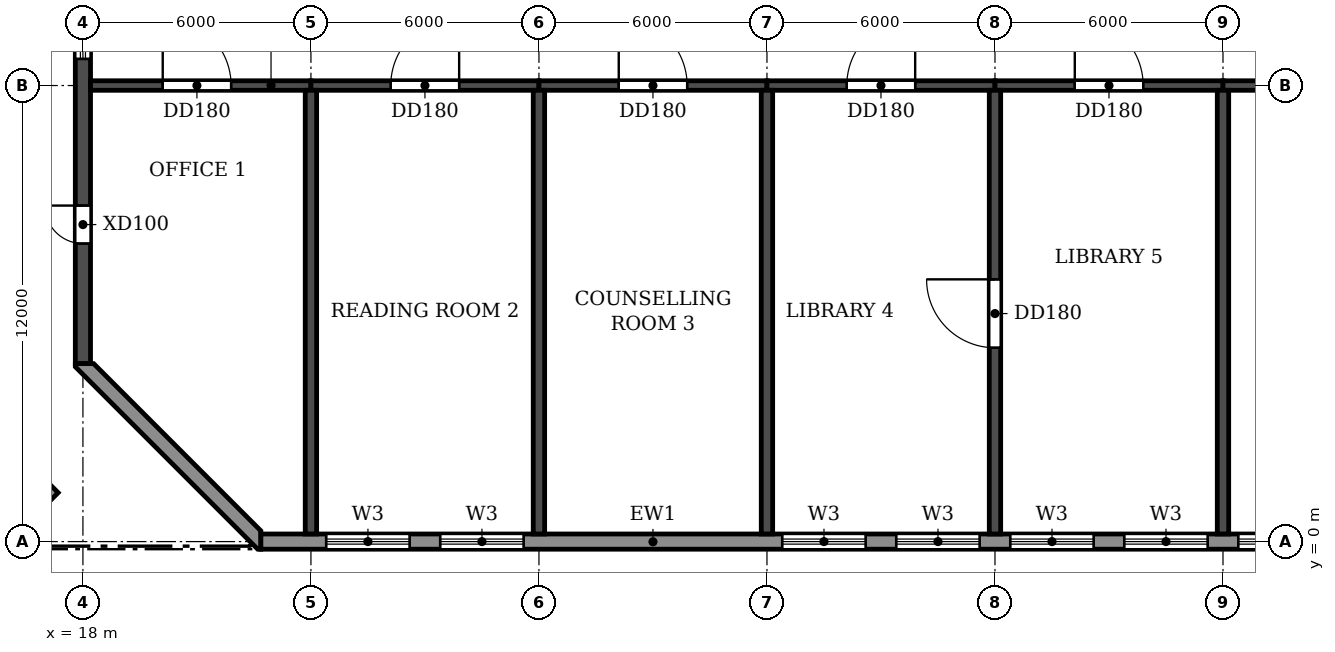
"""IFC4 building model, lengths in metres.
Left out: names, types, materials, properties, quantities, classifications, styles, units other than length and angle.
Written with IfcOpenShell. Run it as: python <this file> out.ifc"""

import sys

from ifc_helpers import new_model, si_unit, direction, frame, frame_2d, origin, place, context, subcontext, project, spatial, polyline, rectangle, outline, extrude, source, transform, mapped, element, fill, save


model = new_model("IFC4")
c1 = context("Model", 3, precision=1e-05, world=origin(), true_north=direction((0.0, 1.0)))
c2 = subcontext(c1, "Body", "Model", "MODEL_VIEW")
j1 = project(units=[si_unit("LENGTHUNIT", "METRE"), si_unit("PLANEANGLEUNIT", "RADIAN")], contexts=[c1])
p1 = place(None, origin())
s1 = spatial("IfcSite", under=j1, at=p1, CompositionType="ELEMENT")
p2 = place(p1, origin())
s2 = spatial("IfcBuilding", under=s1, at=p2, CompositionType="ELEMENT")
p3 = place(p2, frame((0.0, 0.0, 158.7)))
s3 = spatial("IfcBuildingStorey", under=s2, at=p3, CompositionType="ELEMENT", Elevation=158.7)
for number, where, z_axis, x_axis in (
    (1, (24.0, 0.2, 0.0), (0.0, 0.0, 1.0), (0.0, 1.0, 0.0)),
    (2, (30.0, 0.2, 0.0), (0.0, 0.0, 1.0), (0.0, 1.0, 0.0)),
    (3, (36.0, 0.2, 0.0), (0.0, 0.0, 1.0), (0.0, 1.0, 0.0)),
):
    element("IfcWall", number, at=place(p3, frame(where, z_axis=z_axis, x_axis=x_axis)), inside=s3, PredefinedType="SHEAR", context=c2, shape_type="SweptSolid", body=[
        extrude(rectangle(XDim=11.675, YDim=0.3, at=frame_2d((5.837, 0.0))), origin(), (0.0, 0.0, 1.0), 3.07),
    ])
p4 = place(p3, frame((42.0, 0.2, 0.0), z_axis=(0.0, 0.0, 1.0), x_axis=(0.0, 1.0, 0.0)))
e4 = element("IfcWall", 4, at=p4, inside=s3, PredefinedType="SHEAR", context=c2, shape_type="SweptSolid", body=[
    extrude(rectangle(XDim=11.675, YDim=0.3, at=frame_2d((5.837, 0.0))), origin(), (0.0, 0.0, 1.0), 3.07),
])
p5 = place(p4, frame((4.9, 0.0, 0.0)))
e5 = element("IfcOpeningElement", 5, at=p5, cuts=e4, PredefinedType="OPENING", context=c2, shape_type="SweptSolid", body=[
    extrude(rectangle(XDim=1.8, YDim=2.1, at=frame_2d((0.9, 1.05))), frame((0.0, 0.16, 0.0), z_axis=(0.0, -1.0, 0.0), x_axis=(1.0, 0.0, 0.0)), (0.0, 0.0, 1.0), 0.32),
])
p6 = place(p3, frame((48.0, 0.2, 0.0), z_axis=(0.0, 0.0, 1.0), x_axis=(0.0, 1.0, 0.0)))
e6 = element("IfcWall", 6, at=p6, inside=s3, PredefinedType="SHEAR", context=c2, shape_type="SweptSolid", body=[
    extrude(rectangle(XDim=11.675, YDim=0.3, at=frame_2d((5.837, 0.0))), origin(), (0.0, 0.0, 1.0), 3.07),
])
p7 = place(p3, frame((18.0, 4.683, 0.0), z_axis=(0.0, 0.0, 1.0), x_axis=(0.0, 1.0, 0.0)))
e7 = element("IfcWall", 7, at=p7, inside=s3, PredefinedType="SHEAR", context=c2, shape_type="SweptSolid", body=[
    extrude(rectangle(XDim=33.034, YDim=0.4, at=frame_2d((16.517, 0.0))), origin(), (0.0, 0.0, 1.0), 3.07),
])
p8 = place(p7, frame((23.817, 0.0, 0.9)))
e8 = element("IfcOpeningElement", 8, at=p8, cuts=e7, PredefinedType="OPENING", context=c2, shape_type="SweptSolid", body=[
    extrude(rectangle(XDim=1.2, YDim=1.5, at=frame_2d((0.6, 0.75))), frame((0.0, 0.21, 0.0), z_axis=(0.0, -1.0, 0.0), x_axis=(1.0, 0.0, 0.0)), (0.0, 0.0, 1.0), 0.42),
])
p9 = place(p7, frame((8.017, 0.0, 0.9)))
e9 = element("IfcOpeningElement", 9, at=p9, cuts=e7, PredefinedType="OPENING", context=c2, shape_type="SweptSolid", body=[
    extrude(rectangle(XDim=1.2, YDim=1.5, at=frame_2d((0.6, 0.75))), frame((0.0, 0.21, 0.0), z_axis=(0.0, -1.0, 0.0), x_axis=(1.0, 0.0, 0.0)), (0.0, 0.0, 1.0), 0.42),
])
p10 = place(p7, frame((15.917, 0.0, 0.9)))
e10 = element("IfcOpeningElement", 10, at=p10, cuts=e7, PredefinedType="OPENING", context=c2, shape_type="SweptSolid", body=[
    extrude(rectangle(XDim=1.2, YDim=1.5, at=frame_2d((0.6, 0.75))), frame((0.0, 0.21, 0.0), z_axis=(0.0, -1.0, 0.0), x_axis=(1.0, 0.0, 0.0)), (0.0, 0.0, 1.0), 0.42),
])
p11 = place(p7, frame((28.876, 0.0, 0.0)))
e11 = element("IfcOpeningElement", 11, at=p11, cuts=e7, PredefinedType="OPENING", context=c2, shape_type="SweptSolid", body=[
    extrude(rectangle(XDim=1.0, YDim=2.1, at=frame_2d((0.5, 1.05))), frame((0.0, 0.21, 0.0), z_axis=(0.0, -1.0, 0.0), x_axis=(1.0, 0.0, 0.0)), (0.0, 0.0, 1.0), 0.42),
])
p12 = place(p7, frame((3.159, 0.0, 0.0)))
e12 = element("IfcOpeningElement", 12, at=p12, cuts=e7, PredefinedType="OPENING", context=c2, shape_type="SweptSolid", body=[
    extrude(rectangle(XDim=1.0, YDim=2.1, at=frame_2d((0.5, 1.05))), frame((0.0, 0.21, 0.0), z_axis=(0.0, -1.0, 0.0), x_axis=(1.0, 0.0, 0.0)), (0.0, 0.0, 1.0), 0.42),
])
p13 = place(p3, frame((18.2, 12.0, 0.0), z_axis=(0.0, 0.0, 1.0), x_axis=(1.0, 0.0, 0.0)))
e13 = element("IfcWall", 13, at=p13, inside=s3, PredefinedType="SHEAR", context=c2, shape_type="SweptSolid", body=[
    extrude(rectangle(XDim=5.8, YDim=0.25, at=frame_2d((2.9, 0.0))), origin(), (0.0, 0.0, 1.0), 2.47),
])
p14 = place(p13, frame((1.9, 0.0, 0.0)))
e14 = element("IfcOpeningElement", 14, at=p14, cuts=e13, PredefinedType="OPENING", context=c2, shape_type="SweptSolid", body=[
    extrude(rectangle(XDim=1.8, YDim=2.1, at=frame_2d((0.9, 1.05))), frame((0.0, 0.135, 0.0), z_axis=(0.0, -1.0, 0.0), x_axis=(1.0, 0.0, 0.0)), (0.0, 0.0, 1.0), 0.27),
])
p15 = place(p3, frame((24.0, 12.0, 0.0), z_axis=(0.0, 0.0, 1.0), x_axis=(1.0, 0.0, 0.0)))
e15 = element("IfcWall", 15, at=p15, inside=s3, PredefinedType="SHEAR", context=c2, shape_type="SweptSolid", body=[
    extrude(rectangle(XDim=6.0, YDim=0.25, at=frame_2d((3.0, 0.0))), origin(), (0.0, 0.0, 1.0), 2.47),
])
p16 = place(p15, frame((2.1, 0.0, 0.0)))
e16 = element("IfcOpeningElement", 16, at=p16, cuts=e15, PredefinedType="OPENING", context=c2, shape_type="SweptSolid", body=[
    extrude(rectangle(XDim=1.8, YDim=2.1, at=frame_2d((0.9, 1.05))), frame((0.0, 0.135, 0.0), z_axis=(0.0, -1.0, 0.0), x_axis=(1.0, 0.0, 0.0)), (0.0, 0.0, 1.0), 0.27),
])
p17 = place(p3, frame((30.0, 12.0, 0.0), z_axis=(0.0, 0.0, 1.0), x_axis=(1.0, 0.0, 0.0)))
e17 = element("IfcWall", 17, at=p17, inside=s3, PredefinedType="SHEAR", context=c2, shape_type="SweptSolid", body=[
    extrude(rectangle(XDim=6.0, YDim=0.25, at=frame_2d((3.0, 0.0))), origin(), (0.0, 0.0, 1.0), 2.47),
])
p18 = place(p17, frame((2.1, 0.0, 0.0)))
e18 = element("IfcOpeningElement", 18, at=p18, cuts=e17, PredefinedType="OPENING", context=c2, shape_type="SweptSolid", body=[
    extrude(rectangle(XDim=1.8, YDim=2.1, at=frame_2d((0.9, 1.05))), frame((0.0, 0.135, 0.0), z_axis=(0.0, -1.0, 0.0), x_axis=(1.0, 0.0, 0.0)), (0.0, 0.0, 1.0), 0.27),
])
p19 = place(p3, frame((36.0, 12.0, 0.0), z_axis=(0.0, 0.0, 1.0), x_axis=(1.0, 0.0, 0.0)))
e19 = element("IfcWall", 19, at=p19, inside=s3, PredefinedType="SHEAR", context=c2, shape_type="SweptSolid", body=[
    extrude(rectangle(XDim=6.0, YDim=0.25, at=frame_2d((3.0, 0.0))), origin(), (0.0, 0.0, 1.0), 2.47),
])
p20 = place(p19, frame((2.1, 0.0, 0.0)))
e20 = element("IfcOpeningElement", 20, at=p20, cuts=e19, PredefinedType="OPENING", context=c2, shape_type="SweptSolid", body=[
    extrude(rectangle(XDim=1.8, YDim=2.1, at=frame_2d((0.9, 1.05))), frame((0.0, 0.135, 0.0), z_axis=(0.0, -1.0, 0.0), x_axis=(1.0, 0.0, 0.0)), (0.0, 0.0, 1.0), 0.27),
])
p21 = place(p3, frame((42.0, 12.0, 0.0), z_axis=(0.0, 0.0, 1.0), x_axis=(1.0, 0.0, 0.0)))
e21 = element("IfcWall", 21, at=p21, inside=s3, PredefinedType="SHEAR", context=c2, shape_type="SweptSolid", body=[
    extrude(rectangle(XDim=6.0, YDim=0.25, at=frame_2d((3.0, 0.0))), origin(), (0.0, 0.0, 1.0), 2.47),
])
p22 = place(p21, frame((2.1, 0.0, 0.0)))
e22 = element("IfcOpeningElement", 22, at=p22, cuts=e21, PredefinedType="OPENING", context=c2, shape_type="SweptSolid", body=[
    extrude(rectangle(XDim=1.8, YDim=2.1, at=frame_2d((0.9, 1.05))), frame((0.0, 0.135, 0.0), z_axis=(0.0, -1.0, 0.0), x_axis=(1.0, 0.0, 0.0)), (0.0, 0.0, 1.0), 0.27),
])
p23 = place(p3, frame((48.0, 12.0, 0.0), z_axis=(0.0, 0.0, 1.0), x_axis=(1.0, 0.0, 0.0)))
e23 = element("IfcWall", 23, at=p23, inside=s3, PredefinedType="SHEAR", context=c2, shape_type="SweptSolid", body=[
    extrude(rectangle(XDim=6.0, YDim=0.25, at=frame_2d((3.0, 0.0))), origin(), (0.0, 0.0, 1.0), 2.47),
])
p24 = place(p23, frame((2.1, 0.0, 0.0)))
e24 = element("IfcOpeningElement", 24, at=p24, cuts=e23, PredefinedType="OPENING", context=c2, shape_type="SweptSolid", body=[
    extrude(rectangle(XDim=1.8, YDim=2.1, at=frame_2d((0.9, 1.05))), frame((0.0, 0.135, 0.0), z_axis=(0.0, -1.0, 0.0), x_axis=(1.0, 0.0, 0.0)), (0.0, 0.0, 1.0), 0.27),
])
p25 = place(p3, frame((22.683, 0.0, 0.0), z_axis=(0.0, 0.0, 1.0), x_axis=(1.0, 0.0, 0.0)))
e25 = element("IfcWall", 25, at=p25, inside=s3, PredefinedType="STANDARD", context=c2, shape_type="SweptSolid", body=[
    extrude(rectangle(XDim=56.634, YDim=0.4, at=frame_2d((28.317, 0.0))), origin(), (0.0, 0.0, 1.0), 3.07),
])
p26 = place(p25, frame((1.717, 0.0, 0.6)))
e26 = element("IfcOpeningElement", 26, at=p26, cuts=e25, PredefinedType="OPENING", context=c2, shape_type="SweptSolid", body=[
    extrude(rectangle(XDim=2.2, YDim=1.8, at=frame_2d((1.1, 0.9))), frame((0.0, 0.21, 0.0), z_axis=(0.0, -1.0, 0.0), x_axis=(1.0, 0.0, 0.0)), (0.0, 0.0, 1.0), 0.42),
])
p27 = place(p25, frame((4.717, 0.0, 0.6)))
e27 = element("IfcOpeningElement", 27, at=p27, cuts=e25, PredefinedType="OPENING", context=c2, shape_type="SweptSolid", body=[
    extrude(rectangle(XDim=2.2, YDim=1.8, at=frame_2d((1.1, 0.9))), frame((0.0, 0.21, 0.0), z_axis=(0.0, -1.0, 0.0), x_axis=(1.0, 0.0, 0.0)), (0.0, 0.0, 1.0), 0.42),
])
p28 = place(p25, frame((13.717, 0.0, 0.6)))
e28 = element("IfcOpeningElement", 28, at=p28, cuts=e25, PredefinedType="OPENING", context=c2, shape_type="SweptSolid", body=[
    extrude(rectangle(XDim=2.2, YDim=1.8, at=frame_2d((1.1, 0.9))), frame((0.0, 0.21, 0.0), z_axis=(0.0, -1.0, 0.0), x_axis=(1.0, 0.0, 0.0)), (0.0, 0.0, 1.0), 0.42),
])
p29 = place(p25, frame((16.717, 0.0, 0.6)))
e29 = element("IfcOpeningElement", 29, at=p29, cuts=e25, PredefinedType="OPENING", context=c2, shape_type="SweptSolid", body=[
    extrude(rectangle(XDim=2.2, YDim=1.8, at=frame_2d((1.1, 0.9))), frame((0.0, 0.21, 0.0), z_axis=(0.0, -1.0, 0.0), x_axis=(1.0, 0.0, 0.0)), (0.0, 0.0, 1.0), 0.42),
])
p30 = place(p25, frame((19.717, 0.0, 0.6)))
e30 = element("IfcOpeningElement", 30, at=p30, cuts=e25, PredefinedType="OPENING", context=c2, shape_type="SweptSolid", body=[
    extrude(rectangle(XDim=2.2, YDim=1.8, at=frame_2d((1.1, 0.9))), frame((0.0, 0.21, 0.0), z_axis=(0.0, -1.0, 0.0), x_axis=(1.0, 0.0, 0.0)), (0.0, 0.0, 1.0), 0.42),
])
p31 = place(p25, frame((22.717, 0.0, 0.6)))
e31 = element("IfcOpeningElement", 31, at=p31, cuts=e25, PredefinedType="OPENING", context=c2, shape_type="SweptSolid", body=[
    extrude(rectangle(XDim=2.2, YDim=1.8, at=frame_2d((1.1, 0.9))), frame((0.0, 0.21, 0.0), z_axis=(0.0, -1.0, 0.0), x_axis=(1.0, 0.0, 0.0)), (0.0, 0.0, 1.0), 0.42),
])
p32 = place(p25, frame((25.717, 0.0, 0.6)))
e32 = element("IfcOpeningElement", 32, at=p32, cuts=e25, PredefinedType="OPENING", context=c2, shape_type="SweptSolid", body=[
    extrude(rectangle(XDim=2.2, YDim=1.8, at=frame_2d((1.1, 0.9))), frame((0.0, 0.21, 0.0), z_axis=(0.0, -1.0, 0.0), x_axis=(1.0, 0.0, 0.0)), (0.0, 0.0, 1.0), 0.42),
])
p33 = place(p25, frame((28.717, 0.0, 0.6)))
e33 = element("IfcOpeningElement", 33, at=p33, cuts=e25, PredefinedType="OPENING", context=c2, shape_type="SweptSolid", body=[
    extrude(rectangle(XDim=2.2, YDim=1.8, at=frame_2d((1.1, 0.9))), frame((0.0, 0.21, 0.0), z_axis=(0.0, -1.0, 0.0), x_axis=(1.0, 0.0, 0.0)), (0.0, 0.0, 1.0), 0.42),
])
p34 = place(p25, frame((31.717, 0.0, 0.6)))
e34 = element("IfcOpeningElement", 34, at=p34, cuts=e25, PredefinedType="OPENING", context=c2, shape_type="SweptSolid", body=[
    extrude(rectangle(XDim=2.2, YDim=1.8, at=frame_2d((1.1, 0.9))), frame((0.0, 0.21, 0.0), z_axis=(0.0, -1.0, 0.0), x_axis=(1.0, 0.0, 0.0)), (0.0, 0.0, 1.0), 0.42),
])
p35 = place(p25, frame((34.717, 0.0, 0.6)))
e35 = element("IfcOpeningElement", 35, at=p35, cuts=e25, PredefinedType="OPENING", context=c2, shape_type="SweptSolid", body=[
    extrude(rectangle(XDim=2.2, YDim=1.8, at=frame_2d((1.1, 0.9))), frame((0.0, 0.21, 0.0), z_axis=(0.0, -1.0, 0.0), x_axis=(1.0, 0.0, 0.0)), (0.0, 0.0, 1.0), 0.42),
])
p36 = place(p25, frame((37.717, 0.0, 0.6)))
e36 = element("IfcOpeningElement", 36, at=p36, cuts=e25, PredefinedType="OPENING", context=c2, shape_type="SweptSolid", body=[
    extrude(rectangle(XDim=2.2, YDim=1.8, at=frame_2d((1.1, 0.9))), frame((0.0, 0.21, 0.0), z_axis=(0.0, -1.0, 0.0), x_axis=(1.0, 0.0, 0.0)), (0.0, 0.0, 1.0), 0.42),
])
p37 = place(p25, frame((40.717, 0.0, 0.6)))
e37 = element("IfcOpeningElement", 37, at=p37, cuts=e25, PredefinedType="OPENING", context=c2, shape_type="SweptSolid", body=[
    extrude(rectangle(XDim=2.2, YDim=1.8, at=frame_2d((1.1, 0.9))), frame((0.0, 0.21, 0.0), z_axis=(0.0, -1.0, 0.0), x_axis=(1.0, 0.0, 0.0)), (0.0, 0.0, 1.0), 0.42),
])
p38 = place(p25, frame((43.717, 0.0, 0.6)))
e38 = element("IfcOpeningElement", 38, at=p38, cuts=e25, PredefinedType="OPENING", context=c2, shape_type="SweptSolid", body=[
    extrude(rectangle(XDim=2.2, YDim=1.8, at=frame_2d((1.1, 0.9))), frame((0.0, 0.21, 0.0), z_axis=(0.0, -1.0, 0.0), x_axis=(1.0, 0.0, 0.0)), (0.0, 0.0, 1.0), 0.42),
])
p39 = place(p25, frame((46.717, 0.0, 0.6)))
e39 = element("IfcOpeningElement", 39, at=p39, cuts=e25, PredefinedType="OPENING", context=c2, shape_type="SweptSolid", body=[
    extrude(rectangle(XDim=2.2, YDim=1.8, at=frame_2d((1.1, 0.9))), frame((0.0, 0.21, 0.0), z_axis=(0.0, -1.0, 0.0), x_axis=(1.0, 0.0, 0.0)), (0.0, 0.0, 1.0), 0.42),
])
p40 = place(p25, frame((49.717, 0.0, 0.6)))
e40 = element("IfcOpeningElement", 40, at=p40, cuts=e25, PredefinedType="OPENING", context=c2, shape_type="SweptSolid", body=[
    extrude(rectangle(XDim=2.2, YDim=1.8, at=frame_2d((1.1, 0.9))), frame((0.0, 0.21, 0.0), z_axis=(0.0, -1.0, 0.0), x_axis=(1.0, 0.0, 0.0)), (0.0, 0.0, 1.0), 0.42),
])
p41 = place(p25, frame((52.717, 0.0, 0.6)))
e41 = element("IfcOpeningElement", 41, at=p41, cuts=e25, PredefinedType="OPENING", context=c2, shape_type="SweptSolid", body=[
    extrude(rectangle(XDim=2.2, YDim=1.8, at=frame_2d((1.1, 0.9))), frame((0.0, 0.21, 0.0), z_axis=(0.0, -1.0, 0.0), x_axis=(1.0, 0.0, 0.0)), (0.0, 0.0, 1.0), 0.42),
])
p42 = place(p3, origin())
e42 = element("IfcWall", 42, at=p42, inside=s3, PredefinedType="STANDARD", context=c2, shape_type="SweptSolid", body=[
    extrude(outline(polyline([(17.8, 4.683), (17.8, 4.6), (22.6, -0.2), (22.683, -0.2), (22.683, 0.283), (18.283, 4.683), (17.8, 4.683)])), origin(), (0.0, 0.0, 1.0), 3.07),
])
m1 = source(origin(), c2, "Body", "SweptSolid", [
    extrude(outline(polyline([(0.0, 0.0), (2.545, -2.546), (3.394, -1.697), (0.848, 0.848), (0.0, 0.0)])), origin(), (0.0, 0.0, 1.0), 0.6),
])
p43 = place(p3, frame((13.954, 2.983, 0.0)))
e43 = element("IfcWall", 43, at=p43, inside=s3, PredefinedType="USERDEFINED", context=c2, shape_type="MappedRepresentation", body=[
    mapped(m1, transform((0.0, 0.0, 0.0))),
])
p44 = place(p26, origin())
e44 = element("IfcWindow", 44, at=p44, inside=s3, PartitioningType="DOUBLE_PANEL_HORIZONTAL", PredefinedType="WINDOW", context=c2, shape_type="SweptSolid", body=[
    extrude(rectangle(XDim=2.2, YDim=1.8, at=frame_2d((1.1, 0.9))), frame((0.0, 0.03, 0.0), z_axis=(0.0, -1.0, 0.0), x_axis=(1.0, 0.0, 0.0)), (0.0, 0.0, 1.0), 0.06),
])
fill(e26, e44)
p45 = place(p27, origin())
e45 = element("IfcWindow", 45, at=p45, inside=s3, PartitioningType="DOUBLE_PANEL_HORIZONTAL", PredefinedType="WINDOW", context=c2, shape_type="SweptSolid", body=[
    extrude(rectangle(XDim=2.2, YDim=1.8, at=frame_2d((1.1, 0.9))), frame((0.0, 0.03, 0.0), z_axis=(0.0, -1.0, 0.0), x_axis=(1.0, 0.0, 0.0)), (0.0, 0.0, 1.0), 0.06),
])
fill(e27, e45)
p46 = place(p28, origin())
e46 = element("IfcWindow", 46, at=p46, inside=s3, PartitioningType="DOUBLE_PANEL_HORIZONTAL", PredefinedType="WINDOW", context=c2, shape_type="SweptSolid", body=[
    extrude(rectangle(XDim=2.2, YDim=1.8, at=frame_2d((1.1, 0.9))), frame((0.0, 0.03, 0.0), z_axis=(0.0, -1.0, 0.0), x_axis=(1.0, 0.0, 0.0)), (0.0, 0.0, 1.0), 0.06),
])
fill(e28, e46)
p47 = place(p29, origin())
e47 = element("IfcWindow", 47, at=p47, inside=s3, PartitioningType="DOUBLE_PANEL_HORIZONTAL", PredefinedType="WINDOW", context=c2, shape_type="SweptSolid", body=[
    extrude(rectangle(XDim=2.2, YDim=1.8, at=frame_2d((1.1, 0.9))), frame((0.0, 0.03, 0.0), z_axis=(0.0, -1.0, 0.0), x_axis=(1.0, 0.0, 0.0)), (0.0, 0.0, 1.0), 0.06),
])
fill(e29, e47)
p48 = place(p30, origin())
e48 = element("IfcWindow", 48, at=p48, inside=s3, PartitioningType="DOUBLE_PANEL_HORIZONTAL", PredefinedType="WINDOW", context=c2, shape_type="SweptSolid", body=[
    extrude(rectangle(XDim=2.2, YDim=1.8, at=frame_2d((1.1, 0.9))), frame((0.0, 0.03, 0.0), z_axis=(0.0, -1.0, 0.0), x_axis=(1.0, 0.0, 0.0)), (0.0, 0.0, 1.0), 0.06),
])
fill(e30, e48)
p49 = place(p31, origin())
e49 = element("IfcWindow", 49, at=p49, inside=s3, PartitioningType="DOUBLE_PANEL_HORIZONTAL", PredefinedType="WINDOW", context=c2, shape_type="SweptSolid", body=[
    extrude(rectangle(XDim=2.2, YDim=1.8, at=frame_2d((1.1, 0.9))), frame((0.0, 0.03, 0.0), z_axis=(0.0, -1.0, 0.0), x_axis=(1.0, 0.0, 0.0)), (0.0, 0.0, 1.0), 0.06),
])
fill(e31, e49)
p50 = place(p32, origin())
e50 = element("IfcWindow", 50, at=p50, inside=s3, PartitioningType="DOUBLE_PANEL_HORIZONTAL", PredefinedType="WINDOW", context=c2, shape_type="SweptSolid", body=[
    extrude(rectangle(XDim=2.2, YDim=1.8, at=frame_2d((1.1, 0.9))), frame((0.0, 0.03, 0.0), z_axis=(0.0, -1.0, 0.0), x_axis=(1.0, 0.0, 0.0)), (0.0, 0.0, 1.0), 0.06),
])
fill(e32, e50)
p51 = place(p9, origin())
e51 = element("IfcWindow", 51, at=p51, inside=s3, PartitioningType="SINGLE_PANEL", PredefinedType="WINDOW", context=c2, shape_type="SweptSolid", body=[
    extrude(rectangle(XDim=1.2, YDim=1.5, at=frame_2d((0.6, 0.75))), frame((0.0, 0.03, 0.0), z_axis=(0.0, -1.0, 0.0), x_axis=(1.0, 0.0, 0.0)), (0.0, 0.0, 1.0), 0.06),
])
fill(e9, e51)
p52 = place(p14, origin())
e52 = element("IfcDoor", 52, at=p52, inside=s3, OperationType="DOUBLE_DOOR_SINGLE_SWING", PredefinedType="DOOR", context=c2, shape_type="SweptSolid", body=[
    extrude(rectangle(XDim=1.8, YDim=2.1, at=frame_2d((0.9, 1.05))), frame((0.0, 0.025, 0.0), z_axis=(0.0, -1.0, 0.0), x_axis=(1.0, 0.0, 0.0)), (0.0, 0.0, 1.0), 0.05),
])
fill(e14, e52)
p53 = place(p16, origin())
e53 = element("IfcDoor", 53, at=p53, inside=s3, OperationType="DOUBLE_DOOR_SINGLE_SWING", PredefinedType="DOOR", context=c2, shape_type="SweptSolid", body=[
    extrude(rectangle(XDim=1.8, YDim=2.1, at=frame_2d((0.9, 1.05))), frame((0.0, 0.025, 0.0), z_axis=(0.0, -1.0, 0.0), x_axis=(1.0, 0.0, 0.0)), (0.0, 0.0, 1.0), 0.05),
])
fill(e16, e53)
p54 = place(p18, origin())
e54 = element("IfcDoor", 54, at=p54, inside=s3, OperationType="DOUBLE_DOOR_SINGLE_SWING", PredefinedType="DOOR", context=c2, shape_type="SweptSolid", body=[
    extrude(rectangle(XDim=1.8, YDim=2.1, at=frame_2d((0.9, 1.05))), frame((0.0, 0.025, 0.0), z_axis=(0.0, -1.0, 0.0), x_axis=(1.0, 0.0, 0.0)), (0.0, 0.0, 1.0), 0.05),
])
fill(e18, e54)
p55 = place(p20, origin())
e55 = element("IfcDoor", 55, at=p55, inside=s3, OperationType="DOUBLE_DOOR_SINGLE_SWING", PredefinedType="DOOR", context=c2, shape_type="SweptSolid", body=[
    extrude(rectangle(XDim=1.8, YDim=2.1, at=frame_2d((0.9, 1.05))), frame((0.0, 0.025, 0.0), z_axis=(0.0, -1.0, 0.0), x_axis=(1.0, 0.0, 0.0)), (0.0, 0.0, 1.0), 0.05),
])
fill(e20, e55)
p56 = place(p22, origin())
e56 = element("IfcDoor", 56, at=p56, inside=s3, OperationType="DOUBLE_DOOR_SINGLE_SWING", PredefinedType="DOOR", context=c2, shape_type="SweptSolid", body=[
    extrude(rectangle(XDim=1.8, YDim=2.1, at=frame_2d((0.9, 1.05))), frame((0.0, 0.025, 0.0), z_axis=(0.0, -1.0, 0.0), x_axis=(1.0, 0.0, 0.0)), (0.0, 0.0, 1.0), 0.05),
])
fill(e22, e56)
p57 = place(p12, origin())
e57 = element("IfcDoor", 57, at=p57, inside=s3, OperationType="SINGLE_SWING_RIGHT", PredefinedType="DOOR", context=c2, shape_type="SweptSolid", body=[
    extrude(rectangle(XDim=1.0, YDim=2.1, at=frame_2d((0.5, 1.05))), frame((0.0, 0.025, 0.0), z_axis=(0.0, -1.0, 0.0), x_axis=(1.0, 0.0, 0.0)), (0.0, 0.0, 1.0), 0.05),
])
fill(e12, e57)
p58 = place(p5, origin())
e58 = element("IfcDoor", 58, at=p58, inside=s3, OperationType="DOUBLE_DOOR_SINGLE_SWING", PredefinedType="DOOR", context=c2, shape_type="SweptSolid", body=[
    extrude(rectangle(XDim=1.8, YDim=2.1, at=frame_2d((0.9, 1.05))), frame((0.0, 0.025, 0.0), z_axis=(0.0, -1.0, 0.0), x_axis=(1.0, 0.0, 0.0)), (0.0, 0.0, 1.0), 0.05),
])
fill(e5, e58)
save(model, sys.argv[1])
